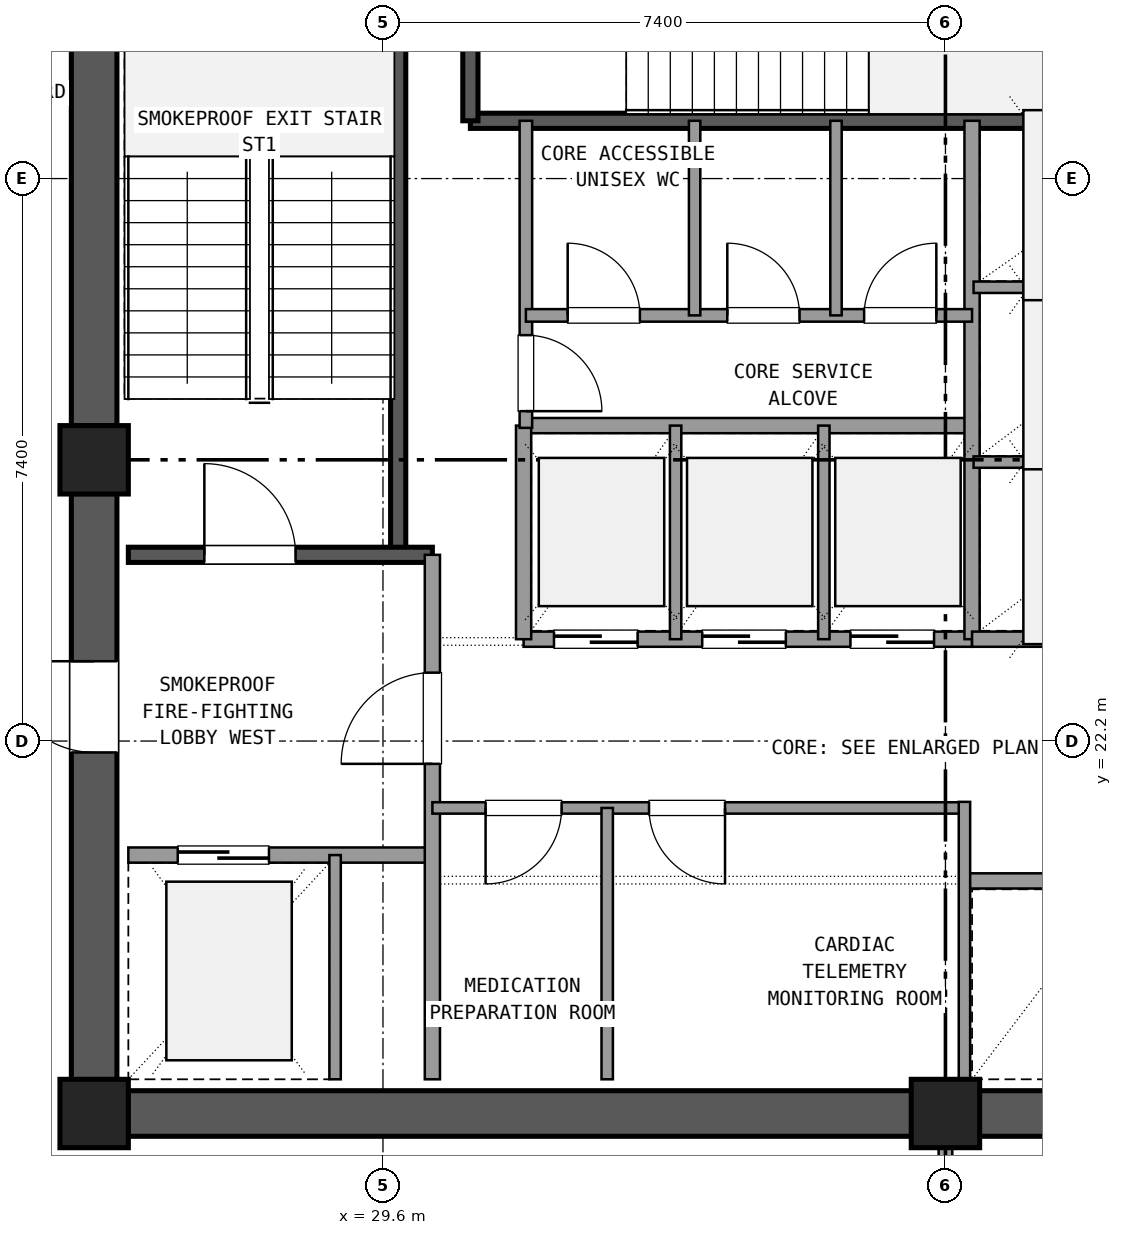
"""IFC4 building model, lengths in metres.
Left out: names, types, materials, properties, quantities, classifications, styles, units other than length and angle.
Written with IfcOpenShell. Run it as: python <this file> out.ifc"""

import sys

from ifc_helpers import new_model, si_unit, direction, frame, frame_2d, origin, origin_2d, place, context, subcontext, project, spatial, rectangle, extrude, element, fill, save


model = new_model("IFC4")
c1 = context("Model", 3, precision=1e-05, world=origin(), true_north=direction((0.0, 1.0)))
c2 = subcontext(c1, "Body", "Model", "MODEL_VIEW")
j1 = project(units=[si_unit("LENGTHUNIT", "METRE"), si_unit("PLANEANGLEUNIT", "RADIAN")], contexts=[c1])
p1 = place(None, origin())
s1 = spatial("IfcSite", under=j1, at=p1, CompositionType="ELEMENT")
p2 = place(p1, origin())
s2 = spatial("IfcBuilding", under=s1, at=p2, CompositionType="ELEMENT")
p3 = place(p2, frame((0.0, 0.0, 188.46)))
s3 = spatial("IfcBuildingStorey", under=s2, at=p3, CompositionType="ELEMENT", Elevation=188.46)
for number, where, z_axis, x_axis in (
    (1, (25.8, 17.3, 0.0), (0.0, 0.0, 1.0), (1.0, 0.0, 0.0)),
    (2, (37.0, 17.3, 0.0), (0.0, 0.0, 1.0), (1.0, 0.0, 0.0)),
    (3, (25.8, 25.9, 0.0), (0.0, 0.0, 1.0), (1.0, 0.0, 0.0)),
):
    element("IfcColumn", number, at=place(p3, frame(where, z_axis=z_axis, x_axis=x_axis)), inside=s3, PredefinedType="COLUMN", context=c2, shape_type="SweptSolid", body=[
        extrude(rectangle(XDim=0.9, YDim=0.9, at=origin_2d()), origin(), (0.0, 0.0, 1.0), 4.32),
    ])
for number, where, z_axis, x_axis in (
    (4, (26.245, 17.3, 0.0), (0.0, 0.0, 1.0), (1.0, 0.0, 0.0)),
    (5, (37.445, 17.3, 0.0), (0.0, 0.0, 1.0), (1.0, 0.0, 0.0)),
):
    element("IfcWall", number, at=place(p3, frame(where, z_axis=z_axis, x_axis=x_axis)), inside=s3, PredefinedType="SHEAR", context=c2, shape_type="SweptSolid", body=[
        extrude(rectangle(XDim=10.31, YDim=0.6, at=frame_2d((5.155, 0.0))), origin(), (0.0, 0.0, 1.0), 4.04),
    ])
p4 = place(p3, frame((25.8, 34.055, 0.0), z_axis=(0.0, 0.0, 1.0), x_axis=(0.0, -1.0, 0.0)))
e6 = element("IfcWall", 6, at=p4, inside=s3, PredefinedType="SHEAR", context=c2, shape_type="SweptSolid", body=[
    extrude(rectangle(XDim=7.71, YDim=0.6, at=frame_2d((3.855, 0.0))), origin(), (0.0, 0.0, 1.0), 4.04),
])
p5 = place(p3, frame((25.8, 25.455, 0.0), z_axis=(0.0, 0.0, 1.0), x_axis=(0.0, -1.0, 0.0)))
e7 = element("IfcWall", 7, at=p5, inside=s3, PredefinedType="SHEAR", context=c2, shape_type="SweptSolid", body=[
    extrude(rectangle(XDim=7.71, YDim=0.6, at=frame_2d((3.855, 0.0))), origin(), (0.0, 0.0, 1.0), 4.04),
])
p6 = place(p5, frame((2.205, 0.0, 0.0)))
e8 = element("IfcOpeningElement", 8, at=p6, cuts=e7, PredefinedType="OPENING", context=c2, shape_type="SweptSolid", body=[
    extrude(rectangle(XDim=1.2, YDim=2.15, at=frame_2d((0.6, 1.075))), frame((0.0, 0.31, 0.0), z_axis=(0.0, -1.0, 0.0), x_axis=(1.0, 0.0, 0.0)), (0.0, 0.0, 1.0), 0.62),
])
p7 = place(p3, frame((29.8, 24.65, 0.0), z_axis=(0.0, 0.0, 1.0), x_axis=(0.0, 1.0, 0.0)))
e9 = element("IfcWall", 9, at=p7, inside=s3, PredefinedType="SHEAR", context=c2, shape_type="SweptSolid", body=[
    extrude(rectangle(XDim=9.4, YDim=0.2, at=frame_2d((4.7, 0.0))), origin(), (0.0, 0.0, 1.0), 4.04),
])
p8 = place(p3, frame((26.25, 24.65, 0.0), z_axis=(0.0, 0.0, 1.0), x_axis=(1.0, 0.0, 0.0)))
e10 = element("IfcWall", 10, at=p8, inside=s3, PredefinedType="SHEAR", context=c2, shape_type="SweptSolid", body=[
    extrude(rectangle(XDim=4.0, YDim=0.2, at=frame_2d((2.0, 0.0))), origin(), (0.0, 0.0, 1.0), 4.04),
])
p9 = place(p8, frame((1.0, 0.0, 0.0)))
e11 = element("IfcOpeningElement", 11, at=p9, cuts=e10, PredefinedType="OPENING", context=c2, shape_type="SweptSolid", body=[
    extrude(rectangle(XDim=1.2, YDim=2.15, at=frame_2d((0.6, 1.075))), frame((0.0, 0.11, 0.0), z_axis=(0.0, -1.0, 0.0), x_axis=(1.0, 0.0, 0.0)), (0.0, 0.0, 1.0), 0.22),
])
p10 = place(p3, frame((30.75, 30.36, 0.0), z_axis=(0.0, 0.0, 1.0), x_axis=(1.0, 0.0, 0.0)))
e12 = element("IfcWall", 12, at=p10, inside=s3, PredefinedType="SHEAR", context=c2, shape_type="SweptSolid", body=[
    extrude(rectangle(XDim=9.5, YDim=0.2, at=frame_2d((4.75, 0.0))), origin(), (0.0, 0.0, 1.0), 4.04),
])
p11 = place(p3, frame((30.75, 30.36, 0.0), z_axis=(0.0, 0.0, 1.0), x_axis=(0.0, 1.0, 0.0)))
e13 = element("IfcWall", 13, at=p11, inside=s3, PredefinedType="SHEAR", context=c2, shape_type="SweptSolid", body=[
    extrude(rectangle(XDim=3.69, YDim=0.2, at=frame_2d((1.845, 0.0))), origin(), (0.0, 0.0, 1.0), 4.04),
])
p12 = place(p3, frame((26.25, 20.7, 0.0), z_axis=(0.0, 0.0, 1.0), x_axis=(1.0, 0.0, 0.0)))
e14 = element("IfcWall", 14, at=p12, inside=s3, PredefinedType="SOLIDWALL", context=c2, shape_type="SweptSolid", body=[
    extrude(rectangle(XDim=4.0, YDim=0.2, at=frame_2d((2.0, 0.0))), origin(), (0.0, 0.0, 1.0), 2.95),
])
p13 = place(p12, frame((0.65, 0.0, 0.0)))
e15 = element("IfcOpeningElement", 15, at=p13, cuts=e14, PredefinedType="OPENING", context=c2, shape_type="SweptSolid", body=[
    extrude(rectangle(XDim=1.2, YDim=2.15, at=frame_2d((0.6, 1.075))), frame((0.0, 0.11, 0.0), z_axis=(0.0, -1.0, 0.0), x_axis=(1.0, 0.0, 0.0)), (0.0, 0.0, 1.0), 0.22),
])
p14 = place(p3, frame((30.25, 17.75, 0.0), z_axis=(0.0, 0.0, 1.0), x_axis=(0.0, 1.0, 0.0)))
e16 = element("IfcWall", 16, at=p14, inside=s3, PredefinedType="SOLIDWALL", context=c2, shape_type="SweptSolid", body=[
    extrude(rectangle(XDim=6.9, YDim=0.2, at=frame_2d((3.45, 0.0))), origin(), (0.0, 0.0, 1.0), 2.95),
])
p15 = place(p14, frame((4.15, 0.0, 0.0)))
e17 = element("IfcOpeningElement", 17, at=p15, cuts=e16, PredefinedType="OPENING", context=c2, shape_type="SweptSolid", body=[
    extrude(rectangle(XDim=1.2, YDim=2.15, at=frame_2d((0.6, 1.075))), frame((0.0, 0.11, 0.0), z_axis=(0.0, -1.0, 0.0), x_axis=(1.0, 0.0, 0.0)), (0.0, 0.0, 1.0), 0.22),
])
p16 = place(p3, frame((28.97, 17.75, 0.0), z_axis=(0.0, 0.0, 1.0), x_axis=(0.0, 1.0, 0.0)))
e18 = element("IfcWall", 18, at=p16, inside=s3, PredefinedType="PARTITIONING", context=c2, shape_type="SweptSolid", body=[
    extrude(rectangle(XDim=2.95, YDim=0.15, at=frame_2d((1.475, 0.0))), origin(), (0.0, 0.0, 1.0), 2.95),
])
p17 = place(p3, frame((30.25, 21.32, 0.0), z_axis=(0.0, 0.0, 1.0), x_axis=(1.0, 0.0, 0.0)))
e19 = element("IfcWall", 19, at=p17, inside=s3, PredefinedType="PARTITIONING", context=c2, shape_type="SweptSolid", body=[
    extrude(rectangle(XDim=7.0, YDim=0.15, at=frame_2d((3.5, 0.0))), origin(), (0.0, 0.0, 1.0), 2.95),
])
p18 = place(p17, frame((0.7, 0.0, 0.0)))
e20 = element("IfcOpeningElement", 20, at=p18, cuts=e19, PredefinedType="OPENING", context=c2, shape_type="SweptSolid", body=[
    extrude(rectangle(XDim=1.0, YDim=2.15, at=frame_2d((0.5, 1.075))), frame((0.0, 0.085, 0.0), z_axis=(0.0, -1.0, 0.0), x_axis=(1.0, 0.0, 0.0)), (0.0, 0.0, 1.0), 0.17),
])
p19 = place(p17, frame((2.85, 0.0, 0.0)))
e21 = element("IfcOpeningElement", 21, at=p19, cuts=e19, PredefinedType="OPENING", context=c2, shape_type="SweptSolid", body=[
    extrude(rectangle(XDim=1.0, YDim=2.15, at=frame_2d((0.5, 1.075))), frame((0.0, 0.085, 0.0), z_axis=(0.0, -1.0, 0.0), x_axis=(1.0, 0.0, 0.0)), (0.0, 0.0, 1.0), 0.17),
])
p20 = place(p3, frame((32.55, 17.75, 0.0), z_axis=(0.0, 0.0, 1.0), x_axis=(0.0, 1.0, 0.0)))
e22 = element("IfcWall", 22, at=p20, inside=s3, PredefinedType="PARTITIONING", context=c2, shape_type="SweptSolid", body=[
    extrude(rectangle(XDim=3.57, YDim=0.15, at=frame_2d((1.785, 0.0))), origin(), (0.0, 0.0, 1.0), 2.95),
])
p21 = place(p3, frame((37.25, 20.36, 0.0), z_axis=(0.0, 0.0, 1.0), x_axis=(1.0, 0.0, 0.0)))
e23 = element("IfcWall", 23, at=p21, inside=s3, PredefinedType="SOLIDWALL", context=c2, shape_type="SweptSolid", body=[
    extrude(rectangle(XDim=6.1, YDim=0.2, at=frame_2d((3.05, 0.0))), origin(), (0.0, 0.0, 1.0), 2.95),
])
p22 = place(p3, frame((37.25, 17.75, 0.0), z_axis=(0.0, 0.0, 1.0), x_axis=(0.0, 1.0, 0.0)))
e24 = element("IfcWall", 24, at=p22, inside=s3, PredefinedType="PARTITIONING", context=c2, shape_type="SweptSolid", body=[
    extrude(rectangle(XDim=3.65, YDim=0.15, at=frame_2d((1.825, 0.0))), origin(), (0.0, 0.0, 1.0), 2.95),
])
p23 = place(p3, frame((31.45, 23.54, 0.0), z_axis=(0.0, 0.0, 1.0), x_axis=(1.0, 0.0, 0.0)))
e25 = element("IfcWall", 25, at=p23, inside=s3, PredefinedType="SOLIDWALL", context=c2, shape_type="SweptSolid", body=[
    extrude(rectangle(XDim=5.9, YDim=0.2, at=frame_2d((2.95, 0.0))), origin(), (0.0, 0.0, 1.0), 2.95),
])
p24 = place(p23, frame((0.4, 0.0, 0.0)))
e26 = element("IfcOpeningElement", 26, at=p24, cuts=e25, PredefinedType="OPENING", context=c2, shape_type="SweptSolid", body=[
    extrude(rectangle(XDim=1.1, YDim=2.15, at=frame_2d((0.55, 1.075))), frame((0.0, 0.11, 0.0), z_axis=(0.0, -1.0, 0.0), x_axis=(1.0, 0.0, 0.0)), (0.0, 0.0, 1.0), 0.22),
])
p25 = place(p23, frame((2.35, 0.0, 0.0)))
e27 = element("IfcOpeningElement", 27, at=p25, cuts=e25, PredefinedType="OPENING", context=c2, shape_type="SweptSolid", body=[
    extrude(rectangle(XDim=1.1, YDim=2.15, at=frame_2d((0.55, 1.075))), frame((0.0, 0.11, 0.0), z_axis=(0.0, -1.0, 0.0), x_axis=(1.0, 0.0, 0.0)), (0.0, 0.0, 1.0), 0.22),
])
p26 = place(p23, frame((4.3, 0.0, 0.0)))
e28 = element("IfcOpeningElement", 28, at=p26, cuts=e25, PredefinedType="OPENING", context=c2, shape_type="SweptSolid", body=[
    extrude(rectangle(XDim=1.1, YDim=2.15, at=frame_2d((0.55, 1.075))), frame((0.0, 0.11, 0.0), z_axis=(0.0, -1.0, 0.0), x_axis=(1.0, 0.0, 0.0)), (0.0, 0.0, 1.0), 0.22),
])
p27 = place(p3, frame((31.45, 26.35, 0.0), z_axis=(0.0, 0.0, 1.0), x_axis=(1.0, 0.0, 0.0)))
e29 = element("IfcWall", 29, at=p27, inside=s3, PredefinedType="SOLIDWALL", context=c2, shape_type="SweptSolid", body=[
    extrude(rectangle(XDim=5.9, YDim=0.2, at=frame_2d((2.95, 0.0))), origin(), (0.0, 0.0, 1.0), 2.95),
])
p28 = place(p3, frame((31.45, 23.54, 0.0), z_axis=(0.0, 0.0, 1.0), x_axis=(0.0, 1.0, 0.0)))
e30 = element("IfcWall", 30, at=p28, inside=s3, PredefinedType="SOLIDWALL", context=c2, shape_type="SweptSolid", body=[
    extrude(rectangle(XDim=2.81, YDim=0.2, at=frame_2d((1.405, 0.0))), origin(), (0.0, 0.0, 1.0), 2.95),
])
for number, where, z_axis, x_axis in (
    (31, (33.45, 23.54, 0.0), (0.0, 0.0, 1.0), (0.0, 1.0, 0.0)),
    (32, (35.4, 23.54, 0.0), (0.0, 0.0, 1.0), (0.0, 1.0, 0.0)),
):
    element("IfcWall", number, at=place(p3, frame(where, z_axis=z_axis, x_axis=x_axis)), inside=s3, PredefinedType="PARTITIONING", context=c2, shape_type="SweptSolid", body=[
        extrude(rectangle(XDim=2.81, YDim=0.15, at=frame_2d((1.405, 0.0))), origin(), (0.0, 0.0, 1.0), 2.95),
    ])
p29 = place(p3, frame((37.35, 23.54, 0.0), z_axis=(0.0, 0.0, 1.0), x_axis=(0.0, 1.0, 0.0)))
e33 = element("IfcWall", 33, at=p29, inside=s3, PredefinedType="SOLIDWALL", context=c2, shape_type="SweptSolid", body=[
    extrude(rectangle(XDim=6.82, YDim=0.2, at=frame_2d((3.41, 0.0))), origin(), (0.0, 0.0, 1.0), 2.95),
])
p30 = place(p3, frame((37.35, 23.54, 0.0), z_axis=(0.0, 0.0, 1.0), x_axis=(1.0, 0.0, 0.0)))
e34 = element("IfcWall", 34, at=p30, inside=s3, PredefinedType="SOLIDWALL", context=c2, shape_type="SweptSolid", body=[
    extrude(rectangle(XDim=3.05, YDim=0.2, at=frame_2d((1.525, 0.0))), origin(), (0.0, 0.0, 1.0), 2.95),
])
for number, where, z_axis, x_axis in (
    (35, (37.37, 25.87, 0.0), (0.0, 0.0, 1.0), (1.0, 0.0, 0.0)),
    (36, (37.37, 28.17, 0.0), (0.0, 0.0, 1.0), (1.0, 0.0, 0.0)),
):
    element("IfcWall", number, at=place(p3, frame(where, z_axis=z_axis, x_axis=x_axis)), inside=s3, PredefinedType="PARTITIONING", context=c2, shape_type="SweptSolid", body=[
        extrude(rectangle(XDim=3.01, YDim=0.15, at=frame_2d((1.505, 0.0))), origin(), (0.0, 0.0, 1.0), 2.95),
    ])
p31 = place(p3, frame((31.48, 26.32, 0.0), z_axis=(0.0, 0.0, 1.0), x_axis=(0.0, 1.0, 0.0)))
e37 = element("IfcWall", 37, at=p31, inside=s3, PredefinedType="PLUMBINGWALL", context=c2, shape_type="SweptSolid", body=[
    extrude(rectangle(XDim=4.04, YDim=0.165, at=frame_2d((2.02, 0.0))), origin(), (0.0, 0.0, 1.0), 2.95),
])
p32 = place(p31, frame((0.22, 0.0, 0.0)))
e38 = element("IfcOpeningElement", 38, at=p32, cuts=e37, PredefinedType="OPENING", context=c2, shape_type="SweptSolid", body=[
    extrude(rectangle(XDim=1.0, YDim=2.15, at=frame_2d((0.5, 1.075))), frame((0.0, 0.093, 0.0), z_axis=(0.0, -1.0, 0.0), x_axis=(1.0, 0.0, 0.0)), (0.0, 0.0, 1.0), 0.185),
])
p33 = place(p3, frame((31.48, 27.8, 0.0), z_axis=(0.0, 0.0, 1.0), x_axis=(1.0, 0.0, 0.0)))
e39 = element("IfcWall", 39, at=p33, inside=s3, PredefinedType="PLUMBINGWALL", context=c2, shape_type="SweptSolid", body=[
    extrude(rectangle(XDim=5.87, YDim=0.165, at=frame_2d((2.935, 0.0))), origin(), (0.0, 0.0, 1.0), 2.95),
])
p34 = place(p33, frame((0.55, 0.0, 0.0)))
e40 = element("IfcOpeningElement", 40, at=p34, cuts=e39, PredefinedType="OPENING", context=c2, shape_type="SweptSolid", body=[
    extrude(rectangle(XDim=0.95, YDim=2.1, at=frame_2d((0.475, 1.05))), frame((0.0, 0.093, 0.0), z_axis=(0.0, -1.0, 0.0), x_axis=(1.0, 0.0, 0.0)), (0.0, 0.0, 1.0), 0.185),
])
p35 = place(p33, frame((2.65, 0.0, 0.0)))
e41 = element("IfcOpeningElement", 41, at=p35, cuts=e39, PredefinedType="OPENING", context=c2, shape_type="SweptSolid", body=[
    extrude(rectangle(XDim=0.95, YDim=2.1, at=frame_2d((0.475, 1.05))), frame((0.0, 0.093, 0.0), z_axis=(0.0, -1.0, 0.0), x_axis=(1.0, 0.0, 0.0)), (0.0, 0.0, 1.0), 0.185),
])
p36 = place(p33, frame((4.45, 0.0, 0.0)))
e42 = element("IfcOpeningElement", 42, at=p36, cuts=e39, PredefinedType="OPENING", context=c2, shape_type="SweptSolid", body=[
    extrude(rectangle(XDim=0.95, YDim=2.1, at=frame_2d((0.475, 1.05))), frame((0.0, 0.093, 0.0), z_axis=(0.0, -1.0, 0.0), x_axis=(1.0, 0.0, 0.0)), (0.0, 0.0, 1.0), 0.185),
])
for number, where, z_axis, x_axis in (
    (43, (33.7, 27.8, 0.0), (0.0, 0.0, 1.0), (0.0, 1.0, 0.0)),
    (44, (35.56, 27.8, 0.0), (0.0, 0.0, 1.0), (0.0, 1.0, 0.0)),
):
    element("IfcWall", number, at=place(p3, frame(where, z_axis=z_axis, x_axis=x_axis)), inside=s3, PredefinedType="PARTITIONING", context=c2, shape_type="SweptSolid", body=[
        extrude(rectangle(XDim=2.56, YDim=0.15, at=frame_2d((1.28, 0.0))), origin(), (0.0, 0.0, 1.0), 2.95),
    ])
p37 = place(p3, frame((37.0, 14.15, 0.0), z_axis=(0.0, 0.0, 1.0), x_axis=(0.0, 1.0, 0.0)))
e45 = element("IfcWall", 45, at=p37, inside=s3, PredefinedType="PARTITIONING", context=c2, shape_type="SweptSolid", body=[
    extrude(rectangle(XDim=2.7, YDim=0.18, at=frame_2d((1.35, 0.0))), origin(), (0.0, 0.0, 1.0), 2.95),
])
p38 = place(p37, frame((0.35, 0.0, 0.0)))
e46 = element("IfcOpeningElement", 46, at=p38, cuts=e45, PredefinedType="OPENING", context=c2, shape_type="SweptSolid", body=[
    extrude(rectangle(XDim=2.0, YDim=2.2, at=frame_2d((1.0, 1.1))), frame((0.0, 0.1, 0.0), z_axis=(0.0, -1.0, 0.0), x_axis=(1.0, 0.0, 0.0)), (0.0, 0.0, 1.0), 0.2),
])
p39 = place(p9, origin())
e47 = element("IfcDoor", 47, at=p39, inside=s3, OperationType="SINGLE_SWING_LEFT", PredefinedType="DOOR", context=c2, shape_type="SweptSolid", body=[
    extrude(rectangle(XDim=1.2, YDim=2.15, at=frame_2d((0.6, 1.075))), frame((0.0, 0.025, 0.0), z_axis=(0.0, -1.0, 0.0), x_axis=(1.0, 0.0, 0.0)), (0.0, 0.0, 1.0), 0.05),
])
fill(e11, e47)
p40 = place(p13, origin())
e48 = element("IfcDoor", 48, at=p40, inside=s3, OperationType="SLIDING_TO_LEFT", PredefinedType="DOOR", context=c2, shape_type="SweptSolid", body=[
    extrude(rectangle(XDim=1.2, YDim=2.15, at=frame_2d((0.6, 1.075))), frame((0.0, 0.025, 0.0), z_axis=(0.0, -1.0, 0.0), x_axis=(1.0, 0.0, 0.0)), (0.0, 0.0, 1.0), 0.05),
])
fill(e15, e48)
p41 = place(p15, origin())
e49 = element("IfcDoor", 49, at=p41, inside=s3, OperationType="SINGLE_SWING_LEFT", PredefinedType="DOOR", context=c2, shape_type="SweptSolid", body=[
    extrude(rectangle(XDim=1.2, YDim=2.15, at=frame_2d((0.6, 1.075))), frame((0.0, 0.025, 0.0), z_axis=(0.0, -1.0, 0.0), x_axis=(1.0, 0.0, 0.0)), (0.0, 0.0, 1.0), 0.05),
])
fill(e17, e49)
p42 = place(p6, frame((1.2, 0.0, 0.0), z_axis=(0.0, 0.0, 1.0), x_axis=(-1.0, 0.0, 0.0)))
e50 = element("IfcDoor", 50, at=p42, inside=s3, OperationType="SINGLE_SWING_LEFT", PredefinedType="DOOR", context=c2, shape_type="SweptSolid", body=[
    extrude(rectangle(XDim=1.2, YDim=2.15, at=frame_2d((0.6, 1.075))), frame((0.0, 0.025, 0.0), z_axis=(0.0, -1.0, 0.0), x_axis=(1.0, 0.0, 0.0)), (0.0, 0.0, 1.0), 0.05),
])
fill(e8, e50)
p43 = place(p18, frame((1.0, 0.0, 0.0), z_axis=(0.0, 0.0, 1.0), x_axis=(-1.0, 0.0, 0.0)))
e51 = element("IfcDoor", 51, at=p43, inside=s3, OperationType="SINGLE_SWING_LEFT", PredefinedType="DOOR", context=c2, shape_type="SweptSolid", body=[
    extrude(rectangle(XDim=1.0, YDim=2.15, at=frame_2d((0.5, 1.075))), frame((0.0, 0.025, 0.0), z_axis=(0.0, -1.0, 0.0), x_axis=(1.0, 0.0, 0.0)), (0.0, 0.0, 1.0), 0.05),
])
fill(e20, e51)
p44 = place(p19, frame((1.0, 0.0, 0.0), z_axis=(0.0, 0.0, 1.0), x_axis=(-1.0, 0.0, 0.0)))
e52 = element("IfcDoor", 52, at=p44, inside=s3, OperationType="SINGLE_SWING_RIGHT", PredefinedType="DOOR", context=c2, shape_type="SweptSolid", body=[
    extrude(rectangle(XDim=1.0, YDim=2.15, at=frame_2d((0.5, 1.075))), frame((0.0, 0.025, 0.0), z_axis=(0.0, -1.0, 0.0), x_axis=(1.0, 0.0, 0.0)), (0.0, 0.0, 1.0), 0.05),
])
fill(e21, e52)
p45 = place(p24, origin())
e53 = element("IfcDoor", 53, at=p45, inside=s3, OperationType="SLIDING_TO_RIGHT", PredefinedType="DOOR", context=c2, shape_type="SweptSolid", body=[
    extrude(rectangle(XDim=1.1, YDim=2.15, at=frame_2d((0.55, 1.075))), frame((0.0, 0.025, 0.0), z_axis=(0.0, -1.0, 0.0), x_axis=(1.0, 0.0, 0.0)), (0.0, 0.0, 1.0), 0.05),
])
fill(e26, e53)
p46 = place(p25, origin())
e54 = element("IfcDoor", 54, at=p46, inside=s3, OperationType="SLIDING_TO_RIGHT", PredefinedType="DOOR", context=c2, shape_type="SweptSolid", body=[
    extrude(rectangle(XDim=1.1, YDim=2.15, at=frame_2d((0.55, 1.075))), frame((0.0, 0.025, 0.0), z_axis=(0.0, -1.0, 0.0), x_axis=(1.0, 0.0, 0.0)), (0.0, 0.0, 1.0), 0.05),
])
fill(e27, e54)
p47 = place(p26, origin())
e55 = element("IfcDoor", 55, at=p47, inside=s3, OperationType="SLIDING_TO_RIGHT", PredefinedType="DOOR", context=c2, shape_type="SweptSolid", body=[
    extrude(rectangle(XDim=1.1, YDim=2.15, at=frame_2d((0.55, 1.075))), frame((0.0, 0.025, 0.0), z_axis=(0.0, -1.0, 0.0), x_axis=(1.0, 0.0, 0.0)), (0.0, 0.0, 1.0), 0.05),
])
fill(e28, e55)
p48 = place(p32, frame((1.0, 0.0, 0.0), z_axis=(0.0, 0.0, 1.0), x_axis=(-1.0, 0.0, 0.0)))
e56 = element("IfcDoor", 56, at=p48, inside=s3, OperationType="SINGLE_SWING_LEFT", PredefinedType="DOOR", context=c2, shape_type="SweptSolid", body=[
    extrude(rectangle(XDim=1.0, YDim=2.15, at=frame_2d((0.5, 1.075))), frame((0.0, 0.025, 0.0), z_axis=(0.0, -1.0, 0.0), x_axis=(1.0, 0.0, 0.0)), (0.0, 0.0, 1.0), 0.05),
])
fill(e38, e56)
p49 = place(p34, origin())
e57 = element("IfcDoor", 57, at=p49, inside=s3, OperationType="SINGLE_SWING_LEFT", PredefinedType="DOOR", context=c2, shape_type="SweptSolid", body=[
    extrude(rectangle(XDim=0.95, YDim=2.1, at=frame_2d((0.475, 1.05))), frame((0.0, 0.025, 0.0), z_axis=(0.0, -1.0, 0.0), x_axis=(1.0, 0.0, 0.0)), (0.0, 0.0, 1.0), 0.05),
])
fill(e40, e57)
p50 = place(p35, origin())
e58 = element("IfcDoor", 58, at=p50, inside=s3, OperationType="SINGLE_SWING_LEFT", PredefinedType="DOOR", context=c2, shape_type="SweptSolid", body=[
    extrude(rectangle(XDim=0.95, YDim=2.1, at=frame_2d((0.475, 1.05))), frame((0.0, 0.025, 0.0), z_axis=(0.0, -1.0, 0.0), x_axis=(1.0, 0.0, 0.0)), (0.0, 0.0, 1.0), 0.05),
])
fill(e41, e58)
p51 = place(p36, origin())
e59 = element("IfcDoor", 59, at=p51, inside=s3, OperationType="SINGLE_SWING_RIGHT", PredefinedType="DOOR", context=c2, shape_type="SweptSolid", body=[
    extrude(rectangle(XDim=0.95, YDim=2.1, at=frame_2d((0.475, 1.05))), frame((0.0, 0.025, 0.0), z_axis=(0.0, -1.0, 0.0), x_axis=(1.0, 0.0, 0.0)), (0.0, 0.0, 1.0), 0.05),
])
fill(e42, e59)
save(model, sys.argv[1])
